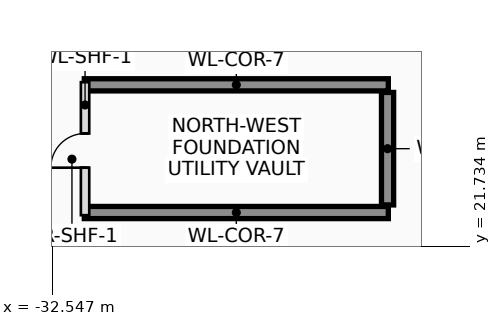
"""IFC4 building model, lengths in metres.
Left out: names, types, materials, properties, quantities, classifications, styles, units other than length and angle.
Written with IfcOpenShell. Run it as: python <this file> out.ifc"""

import sys

from ifc_helpers import new_model, si_unit, direction, frame, frame_2d, origin, place, context, subcontext, project, spatial, rectangle, extrude, element, fill, save


model = new_model("IFC4")
c1 = context("Model", 3, precision=1e-05, world=origin(), true_north=direction((0.0, 1.0)))
c2 = subcontext(c1, "Body", "Model", "MODEL_VIEW")
j1 = project(units=[si_unit("LENGTHUNIT", "METRE"), si_unit("PLANEANGLEUNIT", "RADIAN")], contexts=[c1])
p1 = place(None, origin())
s1 = spatial("IfcSite", under=j1, at=p1, CompositionType="ELEMENT")
p2 = place(p1, origin())
s2 = spatial("IfcBuilding", under=s1, at=p2, CompositionType="ELEMENT")
p3 = place(p2, frame((0.0, 0.0, -9.6)))
s3 = spatial("IfcBuildingStorey", under=s2, at=p3, CompositionType="ELEMENT", Elevation=-9.6)
for number, where, z_axis, x_axis in (
    (1, (-31.7, 25.98, 0.0), (0.0, 0.0, 1.0), (1.0, 0.0, 0.0)),
    (2, (-31.7, 22.62, 0.0), (0.0, 0.0, 1.0), (1.0, 0.0, 0.0)),
):
    element("IfcWall", number, at=place(p3, frame(where, z_axis=z_axis, x_axis=x_axis)), inside=s3, PredefinedType="SHEAR", context=c2, shape_type="SweptSolid", body=[
        extrude(rectangle(XDim=8.0, YDim=0.32, at=frame_2d((4.0, 0.0))), origin(), (0.0, 0.0, 1.0), 4.8),
    ])
p4 = place(p3, frame((-23.72, 22.82, 0.0), z_axis=(0.0, 0.0, 1.0), x_axis=(0.0, 1.0, 0.0)))
e3 = element("IfcWall", 3, at=p4, inside=s3, PredefinedType="SHEAR", context=c2, shape_type="SweptSolid", body=[
    extrude(rectangle(XDim=2.96, YDim=0.32, at=frame_2d((1.48, 0.0))), origin(), (0.0, 0.0, 1.0), 4.8),
])
p5 = place(p3, frame((-31.68, 22.55, 0.0), z_axis=(0.0, 0.0, 1.0), x_axis=(0.0, 1.0, 0.0)))
e4 = element("IfcWall", 4, at=p5, inside=s3, PredefinedType="PLUMBINGWALL", context=c2, shape_type="SweptSolid", body=[
    extrude(rectangle(XDim=3.5, YDim=0.22, at=frame_2d((1.75, 0.0))), origin(), (0.0, 0.0, 1.0), 4.52),
])
p6 = place(p5, frame((1.25, 0.0, 0.0)))
e5 = element("IfcOpeningElement", 5, at=p6, cuts=e4, PredefinedType="OPENING", context=c2, shape_type="SweptSolid", body=[
    extrude(rectangle(XDim=0.9, YDim=2.05, at=frame_2d((0.45, 1.025))), frame((0.0, 0.12, 0.0), z_axis=(0.0, -1.0, 0.0), x_axis=(1.0, 0.0, 0.0)), (0.0, 0.0, 1.0), 0.24),
])
p7 = place(p6, origin())
e6 = element("IfcDoor", 6, at=p7, inside=s3, OperationType="SINGLE_SWING_LEFT", PredefinedType="DOOR", context=c2, shape_type="SweptSolid", body=[
    extrude(rectangle(XDim=0.9, YDim=2.05, at=frame_2d((0.45, 1.025))), frame((0.0, 0.025, 0.0), z_axis=(0.0, -1.0, 0.0), x_axis=(1.0, 0.0, 0.0)), (0.0, 0.0, 1.0), 0.05),
])
fill(e5, e6)
save(model, sys.argv[1])
